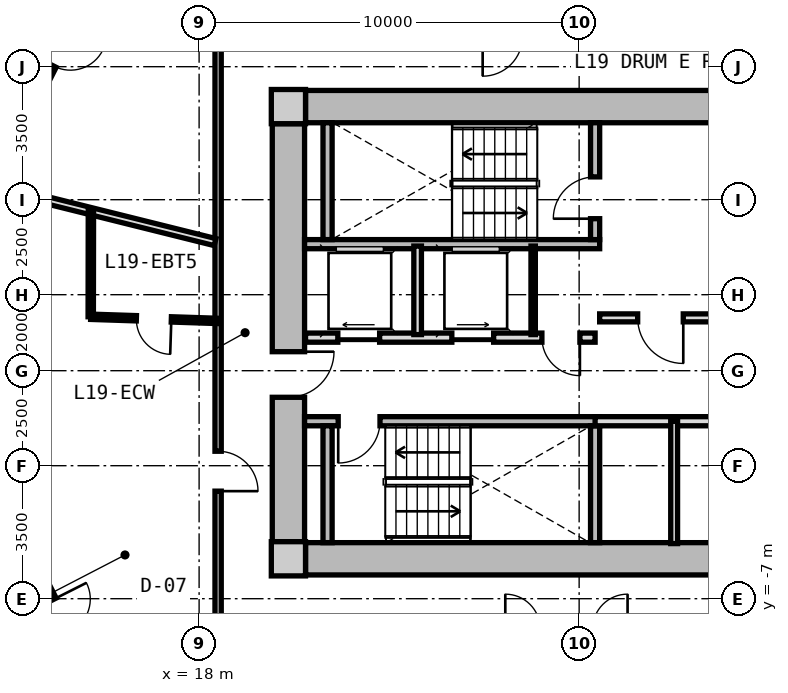
"""IFC4 building model, lengths in metres.
Left out: names, types, materials, properties, quantities, classifications, styles, units other than length and angle.
Written with IfcOpenShell. Run it as: python <this file> out.ifc"""

import sys

from ifc_helpers import new_model, si_unit, direction, frame, frame_2d, origin, origin_2d, place, context, subcontext, project, spatial, rectangle, extrude, source, transform, mapped, element, fill, save


model = new_model("IFC4")
c1 = context("Model", 3, precision=1e-05, world=origin(), true_north=direction((0.0, 1.0)))
c2 = subcontext(c1, "Body", "Model", "MODEL_VIEW")
j1 = project(units=[si_unit("LENGTHUNIT", "METRE"), si_unit("PLANEANGLEUNIT", "RADIAN")], contexts=[c1])
p1 = place(None, origin())
s1 = spatial("IfcSite", under=j1, at=p1, CompositionType="ELEMENT")
p2 = place(p1, origin())
s2 = spatial("IfcBuilding", under=s1, at=p2, CompositionType="ELEMENT")
p3 = place(p2, frame((0.0, 0.0, 64.3)))
s3 = spatial("IfcBuildingStorey", under=s2, at=p3, CompositionType="ELEMENT", Elevation=64.3)
m1 = source(origin(), c2, "Body", "SweptSolid", [
    extrude(rectangle(XDim=0.9, YDim=0.9, at=origin_2d()), origin(), (0.0, 0.0, 1.0), 3.05),
])
for number, where, z_axis, x_axis in (
    (1, (20.35, -5.95, 0.0), (0.0, 0.0, 1.0), (1.0, 0.0, 0.0)),
    (2, (20.35, 5.95, 0.0), (0.0, 0.0, 1.0), (1.0, 0.0, 0.0)),
):
    element("IfcColumn", number, at=place(p3, frame(where, z_axis=z_axis, x_axis=x_axis)), inside=s3, PredefinedType="COLUMN", context=c2, shape_type="MappedRepresentation", body=[
        mapped(m1, transform((0.0, 0.0, 0.0), x_axis=(1.0, 0.0, 0.0), y_axis=(0.0, 1.0, 0.0), z_axis=(0.0, 0.0, 1.0), scale=1.0)),
    ])
m2 = source(origin(), c2, "Body", "SweptSolid", [
    extrude(rectangle(XDim=14.4, YDim=0.85, at=frame_2d((7.2, 0.0))), origin(), (0.0, 0.0, 1.0), 2.79),
])
for number, where, z_axis, x_axis in (
    (3, (20.8, 5.95, 0.0), (0.0, 0.0, 1.0), (1.0, 0.0, 0.0)),
    (4, (35.2, -5.95, 0.0), (0.0, 0.0, 1.0), (-1.0, 0.0, 0.0)),
):
    element("IfcWall", number, at=place(p3, frame(where, z_axis=z_axis, x_axis=x_axis)), inside=s3, PredefinedType="SHEAR", context=c2, shape_type="MappedRepresentation", body=[
        mapped(m2, transform((0.0, 0.0, 0.0), x_axis=(1.0, 0.0, 0.0), y_axis=(0.0, 1.0, 0.0), z_axis=(0.0, 0.0, 1.0), scale=1.0)),
    ])
m3 = source(origin(), c2, "Body", "SweptSolid", [
    extrude(rectangle(XDim=11.0, YDim=0.85, at=frame_2d((5.5, 0.0))), origin(), (0.0, 0.0, 1.0), 2.79),
])
p4 = place(p3, frame((20.35, -5.5, 0.0), z_axis=(0.0, 0.0, 1.0), x_axis=(0.0, 1.0, 0.0)))
e5 = element("IfcWall", 5, at=p4, inside=s3, PredefinedType="SHEAR", context=c2, shape_type="MappedRepresentation", body=[
    mapped(m3, transform((0.0, 0.0, 0.0), x_axis=(1.0, 0.0, 0.0), y_axis=(0.0, 1.0, 0.0), z_axis=(0.0, 0.0, 1.0), scale=1.0)),
])
p5 = place(p4, frame((3.8, 0.0, 0.0)))
e6 = element("IfcOpeningElement", 6, at=p5, cuts=e5, PredefinedType="OPENING", context=c2, shape_type="SweptSolid", body=[
    extrude(rectangle(XDim=1.2, YDim=2.15, at=frame_2d((0.6, 1.075))), frame((0.0, 0.435, 0.0), z_axis=(0.0, -1.0, 0.0), x_axis=(1.0, 0.0, 0.0)), (0.0, 0.0, 1.0), 0.87),
])
m4 = source(origin(), c2, "Body", "SweptSolid", [
    extrude(rectangle(XDim=7.765, YDim=0.24, at=frame_2d((3.883, 0.0))), origin(), (0.0, 0.0, 1.0), 2.79),
])
p6 = place(p3, frame((20.775, 2.33, 0.0), z_axis=(0.0, 0.0, 1.0), x_axis=(1.0, 0.0, 0.0)))
e7 = element("IfcWall", 7, at=p6, inside=s3, PredefinedType="PARTITIONING", context=c2, shape_type="MappedRepresentation", body=[
    mapped(m4, transform((0.0, 0.0, 0.0), x_axis=(1.0, 0.0, 0.0), y_axis=(0.0, 1.0, 0.0), z_axis=(0.0, 0.0, 1.0), scale=1.0)),
])
m5 = source(origin(), c2, "Body", "SweptSolid", [
    extrude(rectangle(XDim=3.075, YDim=0.24, at=frame_2d((1.538, 0.0))), origin(), (0.0, 0.0, 1.0), 2.79),
])
p7 = place(p3, frame((21.38, 2.45, 0.0), z_axis=(0.0, 0.0, 1.0), x_axis=(0.0, 1.0, 0.0)))
e8 = element("IfcWall", 8, at=p7, inside=s3, PredefinedType="PARTITIONING", context=c2, shape_type="MappedRepresentation", body=[
    mapped(m5, transform((0.0, 0.0, 0.0), x_axis=(1.0, 0.0, 0.0), y_axis=(0.0, 1.0, 0.0), z_axis=(0.0, 0.0, 1.0), scale=1.0)),
])
p8 = place(p3, frame((28.42, 2.45, 0.0), z_axis=(0.0, 0.0, 1.0), x_axis=(0.0, 1.0, 0.0)))
e9 = element("IfcWall", 9, at=p8, inside=s3, PredefinedType="PARTITIONING", context=c2, shape_type="MappedRepresentation", body=[
    mapped(m5, transform((0.0, 0.0, 0.0), x_axis=(1.0, 0.0, 0.0), y_axis=(0.0, 1.0, 0.0), z_axis=(0.0, 0.0, 1.0), scale=1.0)),
])
p9 = place(p8, frame((0.55, 0.0, 0.0)))
e10 = element("IfcOpeningElement", 10, at=p9, cuts=e9, PredefinedType="OPENING", context=c2, shape_type="SweptSolid", body=[
    extrude(rectangle(XDim=1.1, YDim=2.15, at=frame_2d((0.55, 1.075))), frame((0.0, 0.13, 0.0), z_axis=(0.0, -1.0, 0.0), x_axis=(1.0, 0.0, 0.0)), (0.0, 0.0, 1.0), 0.26),
])
p10 = place(p3, frame((20.775, -2.33, 0.0), z_axis=(0.0, 0.0, 1.0), x_axis=(1.0, 0.0, 0.0)))
e11 = element("IfcWall", 11, at=p10, inside=s3, PredefinedType="PARTITIONING", context=c2, shape_type="MappedRepresentation", body=[
    mapped(m4, transform((0.0, 0.0, 0.0), x_axis=(1.0, 0.0, 0.0), y_axis=(0.0, 1.0, 0.0), z_axis=(0.0, 0.0, 1.0), scale=1.0)),
])
p11 = place(p10, frame((0.885, 0.0, 0.0)))
e12 = element("IfcOpeningElement", 12, at=p11, cuts=e11, PredefinedType="OPENING", context=c2, shape_type="SweptSolid", body=[
    extrude(rectangle(XDim=1.1, YDim=2.15, at=frame_2d((0.55, 1.075))), frame((0.0, 0.13, 0.0), z_axis=(0.0, -1.0, 0.0), x_axis=(1.0, 0.0, 0.0)), (0.0, 0.0, 1.0), 0.26),
])
for number, where, z_axis, x_axis in (
    (13, (21.38, -5.525, 0.0), (0.0, 0.0, 1.0), (0.0, 1.0, 0.0)),
    (14, (28.42, -5.525, 0.0), (0.0, 0.0, 1.0), (0.0, 1.0, 0.0)),
):
    element("IfcWall", number, at=place(p3, frame(where, z_axis=z_axis, x_axis=x_axis)), inside=s3, PredefinedType="PARTITIONING", context=c2, shape_type="MappedRepresentation", body=[
        mapped(m5, transform((0.0, 0.0, 0.0), x_axis=(1.0, 0.0, 0.0), y_axis=(0.0, 1.0, 0.0), z_axis=(0.0, 0.0, 1.0), scale=1.0)),
    ])
m6 = source(origin(), c2, "Body", "SweptSolid", [
    extrude(rectangle(XDim=6.66, YDim=0.21, at=frame_2d((3.33, 0.0))), origin(), (0.0, 0.0, 1.0), 2.775),
])
p12 = place(p3, frame((28.54, 0.39, 0.0), z_axis=(0.0, 0.0, 1.0), x_axis=(1.0, 0.0, 0.0)))
e15 = element("IfcWall", 15, at=p12, inside=s3, PredefinedType="PARTITIONING", context=c2, shape_type="MappedRepresentation", body=[
    mapped(m6, transform((0.0, 0.0, 0.0), x_axis=(1.0, 0.0, 0.0), y_axis=(0.0, 1.0, 0.0), z_axis=(0.0, 0.0, 1.0), scale=1.0)),
])
p13 = place(p12, frame((1.0, 0.0, 0.0)))
e16 = element("IfcOpeningElement", 16, at=p13, cuts=e15, PredefinedType="OPENING", context=c2, shape_type="SweptSolid", body=[
    extrude(rectangle(XDim=1.2, YDim=2.15, at=frame_2d((0.6, 1.075))), frame((0.0, 0.115, 0.0), z_axis=(0.0, -1.0, 0.0), x_axis=(1.0, 0.0, 0.0)), (0.0, 0.0, 1.0), 0.23),
])
m7 = source(origin(), c2, "Body", "SweptSolid", [
    extrude(rectangle(XDim=7.62, YDim=0.24, at=frame_2d((3.81, 0.0))), origin(), (0.0, 0.0, 1.0), 2.775),
])
p14 = place(p3, frame((20.8, -0.13, 0.0), z_axis=(0.0, 0.0, 1.0), x_axis=(1.0, 0.0, 0.0)))
e17 = element("IfcWall", 17, at=p14, inside=s3, PredefinedType="PARTITIONING", context=c2, shape_type="MappedRepresentation", body=[
    mapped(m7, transform((0.0, 0.0, 0.0), x_axis=(1.0, 0.0, 0.0), y_axis=(0.0, 1.0, 0.0), z_axis=(0.0, 0.0, 1.0), scale=1.0)),
])
p15 = place(p14, frame((6.22, 0.0, 0.0)))
e18 = element("IfcOpeningElement", 18, at=p15, cuts=e17, PredefinedType="OPENING", context=c2, shape_type="SweptSolid", body=[
    extrude(rectangle(XDim=1.0, YDim=2.1, at=frame_2d((0.5, 1.05))), frame((0.0, 0.13, 0.0), z_axis=(0.0, -1.0, 0.0), x_axis=(1.0, 0.0, 0.0)), (0.0, 0.0, 1.0), 0.26),
])
p16 = place(p14, frame((0.85, 0.0, 0.0)))
e19 = element("IfcOpeningElement", 19, at=p16, cuts=e17, PredefinedType="OPENING", context=c2, shape_type="SweptSolid", body=[
    extrude(rectangle(XDim=1.1, YDim=2.2, at=frame_2d((0.55, 1.1))), frame((0.0, 0.13, 0.0), z_axis=(0.0, -1.0, 0.0), x_axis=(1.0, 0.0, 0.0)), (0.0, 0.0, 1.0), 0.26),
])
p17 = place(p14, frame((3.85, 0.0, 0.0)))
e20 = element("IfcOpeningElement", 20, at=p17, cuts=e17, PredefinedType="OPENING", context=c2, shape_type="SweptSolid", body=[
    extrude(rectangle(XDim=1.1, YDim=2.2, at=frame_2d((0.55, 1.1))), frame((0.0, 0.13, 0.0), z_axis=(0.0, -1.0, 0.0), x_axis=(1.0, 0.0, 0.0)), (0.0, 0.0, 1.0), 0.26),
])
m8 = source(origin(), c2, "Body", "SweptSolid", [
    extrude(rectangle(XDim=2.33, YDim=0.115, at=frame_2d((1.165, 0.0))), origin(), (0.0, 0.0, 1.0), 2.775),
])
p18 = place(p3, frame((26.79, -0.05, 0.0), z_axis=(0.0, 0.0, 1.0), x_axis=(0.0, 1.0, 0.0)))
e21 = element("IfcWall", 21, at=p18, inside=s3, PredefinedType="PARTITIONING", context=c2, shape_type="MappedRepresentation", body=[
    mapped(m8, transform((0.0, 0.0, 0.0), x_axis=(1.0, 0.0, 0.0), y_axis=(0.0, 1.0, 0.0), z_axis=(0.0, 0.0, 1.0), scale=1.0)),
])
m9 = source(origin(), c2, "Body", "SweptSolid", [
    extrude(rectangle(XDim=2.33, YDim=0.2, at=frame_2d((1.165, 0.0))), origin(), (0.0, 0.0, 1.0), 2.775),
])
p19 = place(p3, frame((23.75, -0.05, 0.0), z_axis=(0.0, 0.0, 1.0), x_axis=(0.0, 1.0, 0.0)))
e22 = element("IfcWall", 22, at=p19, inside=s3, PredefinedType="PARTITIONING", context=c2, shape_type="MappedRepresentation", body=[
    mapped(m9, transform((0.0, 0.0, 0.0), x_axis=(1.0, 0.0, 0.0), y_axis=(0.0, 1.0, 0.0), z_axis=(0.0, 0.0, 1.0), scale=1.0)),
])
m10 = source(origin(), c2, "Body", "SweptSolid", [
    extrude(rectangle(XDim=4.13, YDim=0.24, at=frame_2d((2.065, 0.0))), origin(), (0.0, 0.0, 1.0), 2.775),
])
p20 = place(p3, frame((28.42, -2.33, 0.0), z_axis=(0.0, 0.0, 1.0), x_axis=(1.0, 0.0, 0.0)))
e23 = element("IfcWall", 23, at=p20, inside=s3, PredefinedType="PARTITIONING", context=c2, shape_type="MappedRepresentation", body=[
    mapped(m10, transform((0.0, 0.0, 0.0), x_axis=(1.0, 0.0, 0.0), y_axis=(0.0, 1.0, 0.0), z_axis=(0.0, 0.0, 1.0), scale=1.0)),
])
m11 = source(origin(), c2, "Body", "SweptSolid", [
    extrude(rectangle(XDim=3.22, YDim=0.18, at=frame_2d((1.61, 0.0))), origin(), (0.0, 0.0, 1.0), 2.775),
])
p21 = place(p3, frame((30.5, -5.55, 0.0), z_axis=(0.0, 0.0, 1.0), x_axis=(0.0, 1.0, 0.0)))
e24 = element("IfcWall", 24, at=p21, inside=s3, PredefinedType="PARTITIONING", context=c2, shape_type="MappedRepresentation", body=[
    mapped(m11, transform((0.0, 0.0, 0.0), x_axis=(1.0, 0.0, 0.0), y_axis=(0.0, 1.0, 0.0), z_axis=(0.0, 0.0, 1.0), scale=1.0)),
])
m12 = source(origin(), c2, "Body", "SweptSolid", [
    extrude(rectangle(XDim=15.6, YDim=0.165, at=frame_2d((7.8, 0.0))), origin(), (0.0, 0.0, 1.0), 2.775),
])
p22 = place(p3, frame((18.5, -7.8, 0.0), z_axis=(0.0, 0.0, 1.0), x_axis=(0.0, 1.0, 0.0)))
e25 = element("IfcWall", 25, at=p22, inside=s3, PredefinedType="PARTITIONING", context=c2, shape_type="MappedRepresentation", body=[
    mapped(m12, transform((0.0, 0.0, 0.0), x_axis=(1.0, 0.0, 0.0), y_axis=(0.0, 1.0, 0.0), z_axis=(0.0, 0.0, 1.0), scale=1.0)),
])
p23 = place(p22, frame((3.63, 0.0, 0.0)))
e26 = element("IfcOpeningElement", 26, at=p23, cuts=e25, PredefinedType="OPENING", context=c2, shape_type="SweptSolid", body=[
    extrude(rectangle(XDim=1.05, YDim=2.15, at=frame_2d((0.525, 1.075))), frame((0.0, 0.093, 0.0), z_axis=(0.0, -1.0, 0.0), x_axis=(1.0, 0.0, 0.0)), (0.0, 0.0, 1.0), 0.185),
])
m13 = source(origin(), c2, "Body", "SweptSolid", [
    extrude(rectangle(XDim=9.737, YDim=0.19, at=frame_2d((4.869, 0.0))), origin(), (0.0, 0.0, 1.0), 2.225),
])
p24 = place(p3, frame((18.42, 2.385, 0.0), z_axis=(0.0, 0.0, 1.0), x_axis=(-0.970392716238, 0.241532557375, 0.0)))
e27 = element("IfcWall", 27, at=p24, inside=s3, PredefinedType="PARTITIONING", context=c2, shape_type="MappedRepresentation", body=[
    mapped(m13, transform((0.0, 0.0, 0.0), x_axis=(1.0, 0.0, 0.0), y_axis=(0.0, 1.0, 0.0), z_axis=(0.0, 0.0, 1.0), scale=1.0)),
])
m14 = source(origin(), c2, "Body", "SweptSolid", [
    extrude(rectangle(XDim=8.018, YDim=0.115, at=frame_2d((4.009, 0.0))), origin(), (0.0, 0.0, 1.0), 2.775),
])
p25 = place(p3, frame((12.596, -3.854, 0.0), z_axis=(0.0, 0.0, 1.0), x_axis=(0.450134355233, -0.89296084026, 0.0)))
e28 = element("IfcWall", 28, at=p25, inside=s3, PredefinedType="PARTITIONING", context=c2, shape_type="MappedRepresentation", body=[
    mapped(m14, transform((0.0, 0.0, 0.0), x_axis=(1.0, 0.0, 0.0), y_axis=(0.0, 1.0, 0.0), z_axis=(0.0, 0.0, 1.0), scale=1.0)),
])
p26 = place(p25, frame((3.534, 0.0, 0.0)))
e29 = element("IfcOpeningElement", 29, at=p26, cuts=e28, PredefinedType="OPENING", context=c2, shape_type="SweptSolid", body=[
    extrude(rectangle(XDim=0.95, YDim=2.1, at=frame_2d((0.475, 1.05))), frame((0.0, 0.067, 0.0), z_axis=(0.0, -1.0, 0.0), x_axis=(1.0, 0.0, 0.0)), (0.0, 0.0, 1.0), 0.135),
])
m15 = source(origin(), c2, "Body", "SweptSolid", [
    extrude(rectangle(XDim=3.323, YDim=0.14, at=frame_2d((1.662, 0.0))), origin(), (0.0, 0.0, 1.0), 2.775),
])
p27 = place(p3, frame((18.47, 0.311, 0.0), z_axis=(0.0, 0.0, 1.0), x_axis=(-0.999467979553, 0.032615300817, 0.0)))
e30 = element("IfcWall", 30, at=p27, inside=s3, PredefinedType="PARTITIONING", context=c2, shape_type="MappedRepresentation", body=[
    mapped(m15, transform((0.0, 0.0, 0.0), x_axis=(1.0, 0.0, 0.0), y_axis=(0.0, 1.0, 0.0), z_axis=(0.0, 0.0, 1.0), scale=1.0)),
])
p28 = place(p27, frame((1.202, 0.0, 0.0)))
e31 = element("IfcOpeningElement", 31, at=p28, cuts=e30, PredefinedType="OPENING", context=c2, shape_type="SweptSolid", body=[
    extrude(rectangle(XDim=0.92, YDim=2.1, at=frame_2d((0.46, 1.05))), frame((0.0, 0.08, 0.0), z_axis=(0.0, -1.0, 0.0), x_axis=(1.0, 0.0, 0.0)), (0.0, 0.0, 1.0), 0.16),
])
m16 = source(origin(), c2, "Body", "SweptSolid", [
    extrude(rectangle(XDim=2.795, YDim=0.14, at=frame_2d((1.397, 0.0))), origin(), (0.0, 0.0, 1.0), 2.775),
])
p29 = place(p3, frame((15.148, 0.419, 0.0), z_axis=(0.0, 0.0, 1.0), x_axis=(0.001659531299, 0.999998622977, 0.0)))
e32 = element("IfcWall", 32, at=p29, inside=s3, PredefinedType="PARTITIONING", context=c2, shape_type="MappedRepresentation", body=[
    mapped(m16, transform((0.0, 0.0, 0.0), x_axis=(1.0, 0.0, 0.0), y_axis=(0.0, 1.0, 0.0), z_axis=(0.0, 0.0, 1.0), scale=1.0)),
])
p30 = place(p3, frame((16.205, 11.014, 0.0), z_axis=(0.0, 0.0, 1.0), x_axis=(-0.450134355233, -0.89296084026, 0.0)))
e33 = element("IfcWall", 33, at=p30, inside=s3, PredefinedType="PARTITIONING", context=c2, shape_type="MappedRepresentation", body=[
    mapped(m14, transform((0.0, 0.0, 0.0), x_axis=(1.0, 0.0, 0.0), y_axis=(0.0, 1.0, 0.0), z_axis=(0.0, 0.0, 1.0), scale=1.0)),
])
p31 = place(p30, frame((3.534, 0.0, 0.0)))
e34 = element("IfcOpeningElement", 34, at=p31, cuts=e33, PredefinedType="OPENING", context=c2, shape_type="SweptSolid", body=[
    extrude(rectangle(XDim=0.95, YDim=2.1, at=frame_2d((0.475, 1.05))), frame((0.0, 0.067, 0.0), z_axis=(0.0, -1.0, 0.0), x_axis=(1.0, 0.0, 0.0)), (0.0, 0.0, 1.0), 0.135),
])
m17 = source(origin(), c2, "Body", "SweptSolid", [
    extrude(rectangle(XDim=1.1, YDim=2.15, at=frame_2d((0.55, 1.075))), frame((0.0, 0.025, 0.0), z_axis=(0.0, -1.0, 0.0), x_axis=(1.0, 0.0, 0.0)), (0.0, 0.0, 1.0), 0.05),
])
p32 = place(p9, origin())
e35 = element("IfcDoor", 35, at=p32, inside=s3, OperationType="SINGLE_SWING_LEFT", PredefinedType="DOOR", context=c2, shape_type="MappedRepresentation", body=[
    mapped(m17, transform((0.0, 0.0, 0.0), x_axis=(1.0, 0.0, 0.0), y_axis=(0.0, 1.0, 0.0), z_axis=(0.0, 0.0, 1.0), scale=1.0)),
])
fill(e10, e35)
p33 = place(p11, frame((1.1, 0.0, 0.0), z_axis=(0.0, 0.0, 1.0), x_axis=(-1.0, 0.0, 0.0)))
e36 = element("IfcDoor", 36, at=p33, inside=s3, OperationType="SINGLE_SWING_RIGHT", PredefinedType="DOOR", context=c2, shape_type="MappedRepresentation", body=[
    mapped(m17, transform((0.0, 0.0, 0.0), x_axis=(1.0, 0.0, 0.0), y_axis=(0.0, 1.0, 0.0), z_axis=(0.0, 0.0, 1.0), scale=1.0)),
])
fill(e12, e36)
m18 = source(origin(), c2, "Body", "SweptSolid", [
    extrude(rectangle(XDim=1.2, YDim=2.15, at=frame_2d((0.6, 1.075))), frame((0.0, 0.025, 0.0), z_axis=(0.0, -1.0, 0.0), x_axis=(1.0, 0.0, 0.0)), (0.0, 0.0, 1.0), 0.05),
])
p34 = place(p13, frame((1.2, 0.0, 0.0), z_axis=(0.0, 0.0, 1.0), x_axis=(-1.0, 0.0, 0.0)))
e37 = element("IfcDoor", 37, at=p34, inside=s3, OperationType="SINGLE_SWING_LEFT", PredefinedType="DOOR", context=c2, shape_type="MappedRepresentation", body=[
    mapped(m18, transform((0.0, 0.0, 0.0), x_axis=(1.0, 0.0, 0.0), y_axis=(0.0, 1.0, 0.0), z_axis=(0.0, 0.0, 1.0), scale=1.0)),
])
fill(e16, e37)
p35 = place(p5, frame((1.2, 0.0, 0.0), z_axis=(0.0, 0.0, 1.0), x_axis=(-1.0, 0.0, 0.0)))
e38 = element("IfcDoor", 38, at=p35, inside=s3, OperationType="SINGLE_SWING_LEFT", PredefinedType="DOOR", context=c2, shape_type="MappedRepresentation", body=[
    mapped(m18, transform((0.0, 0.0, 0.0), x_axis=(1.0, 0.0, 0.0), y_axis=(0.0, 1.0, 0.0), z_axis=(0.0, 0.0, 1.0), scale=1.0)),
])
fill(e6, e38)
m19 = source(origin(), c2, "Body", "SweptSolid", [
    extrude(rectangle(XDim=1.0, YDim=2.1, at=frame_2d((0.5, 1.05))), frame((0.0, 0.025, 0.0), z_axis=(0.0, -1.0, 0.0), x_axis=(1.0, 0.0, 0.0)), (0.0, 0.0, 1.0), 0.05),
])
p36 = place(p15, frame((1.0, 0.0, 0.0), z_axis=(0.0, 0.0, 1.0), x_axis=(-1.0, 0.0, 0.0)))
e39 = element("IfcDoor", 39, at=p36, inside=s3, OperationType="SINGLE_SWING_LEFT", PredefinedType="DOOR", context=c2, shape_type="MappedRepresentation", body=[
    mapped(m19, transform((0.0, 0.0, 0.0), x_axis=(1.0, 0.0, 0.0), y_axis=(0.0, 1.0, 0.0), z_axis=(0.0, 0.0, 1.0), scale=1.0)),
])
fill(e18, e39)
m20 = source(origin(), c2, "Body", "SweptSolid", [
    extrude(rectangle(XDim=1.1, YDim=2.2, at=frame_2d((0.55, 1.1))), frame((0.0, 0.025, 0.0), z_axis=(0.0, -1.0, 0.0), x_axis=(1.0, 0.0, 0.0)), (0.0, 0.0, 1.0), 0.05),
])
p37 = place(p16, origin())
e40 = element("IfcDoor", 40, at=p37, inside=s3, OperationType="SLIDING_TO_LEFT", PredefinedType="DOOR", context=c2, shape_type="MappedRepresentation", body=[
    mapped(m20, transform((0.0, 0.0, 0.0), x_axis=(1.0, 0.0, 0.0), y_axis=(0.0, 1.0, 0.0), z_axis=(0.0, 0.0, 1.0), scale=1.0)),
])
fill(e19, e40)
p38 = place(p17, origin())
e41 = element("IfcDoor", 41, at=p38, inside=s3, OperationType="SLIDING_TO_RIGHT", PredefinedType="DOOR", context=c2, shape_type="MappedRepresentation", body=[
    mapped(m20, transform((0.0, 0.0, 0.0), x_axis=(1.0, 0.0, 0.0), y_axis=(0.0, 1.0, 0.0), z_axis=(0.0, 0.0, 1.0), scale=1.0)),
])
fill(e20, e41)
m21 = source(origin(), c2, "Body", "SweptSolid", [
    extrude(rectangle(XDim=1.05, YDim=2.15, at=frame_2d((0.525, 1.075))), frame((0.0, 0.025, 0.0), z_axis=(0.0, -1.0, 0.0), x_axis=(1.0, 0.0, 0.0)), (0.0, 0.0, 1.0), 0.05),
])
p39 = place(p23, frame((1.05, 0.0, 0.0), z_axis=(0.0, 0.0, 1.0), x_axis=(-1.0, 0.0, 0.0)))
e42 = element("IfcDoor", 42, at=p39, inside=s3, OperationType="SINGLE_SWING_RIGHT", PredefinedType="DOOR", context=c2, shape_type="MappedRepresentation", body=[
    mapped(m21, transform((0.0, 0.0, 0.0), x_axis=(1.0, 0.0, 0.0), y_axis=(0.0, 1.0, 0.0), z_axis=(0.0, 0.0, 1.0), scale=1.0)),
])
fill(e26, e42)
m22 = source(origin(), c2, "Body", "SweptSolid", [
    extrude(rectangle(XDim=0.92, YDim=2.1, at=frame_2d((0.46, 1.05))), frame((0.0, 0.025, 0.0), z_axis=(0.0, -1.0, 0.0), x_axis=(1.0, 0.0, 0.0)), (0.0, 0.0, 1.0), 0.05),
])
p40 = place(p28, origin())
e43 = element("IfcDoor", 43, at=p40, inside=s3, OperationType="SINGLE_SWING_LEFT", PredefinedType="DOOR", context=c2, shape_type="MappedRepresentation", body=[
    mapped(m22, transform((0.0, 0.0, 0.0), x_axis=(1.0, 0.0, 0.0), y_axis=(0.0, 1.0, 0.0), z_axis=(0.0, 0.0, 1.0), scale=1.0)),
])
fill(e31, e43)
m23 = source(origin(), c2, "Body", "SweptSolid", [
    extrude(rectangle(XDim=0.95, YDim=2.1, at=frame_2d((0.475, 1.05))), frame((0.0, 0.025, 0.0), z_axis=(0.0, -1.0, 0.0), x_axis=(1.0, 0.0, 0.0)), (0.0, 0.0, 1.0), 0.05),
])
p41 = place(p26, origin())
e44 = element("IfcDoor", 44, at=p41, inside=s3, OperationType="SINGLE_SWING_LEFT", PredefinedType="DOOR", context=c2, shape_type="MappedRepresentation", body=[
    mapped(m23, transform((0.0, 0.0, 0.0), x_axis=(1.0, 0.0, 0.0), y_axis=(0.0, 1.0, 0.0), z_axis=(0.0, 0.0, 1.0), scale=1.0)),
])
fill(e29, e44)
p42 = place(p31, origin())
e45 = element("IfcDoor", 45, at=p42, inside=s3, OperationType="SINGLE_SWING_LEFT", PredefinedType="DOOR", context=c2, shape_type="MappedRepresentation", body=[
    mapped(m23, transform((0.0, 0.0, 0.0), x_axis=(1.0, 0.0, 0.0), y_axis=(0.0, 1.0, 0.0), z_axis=(0.0, 0.0, 1.0), scale=1.0)),
])
fill(e34, e45)
save(model, sys.argv[1])
